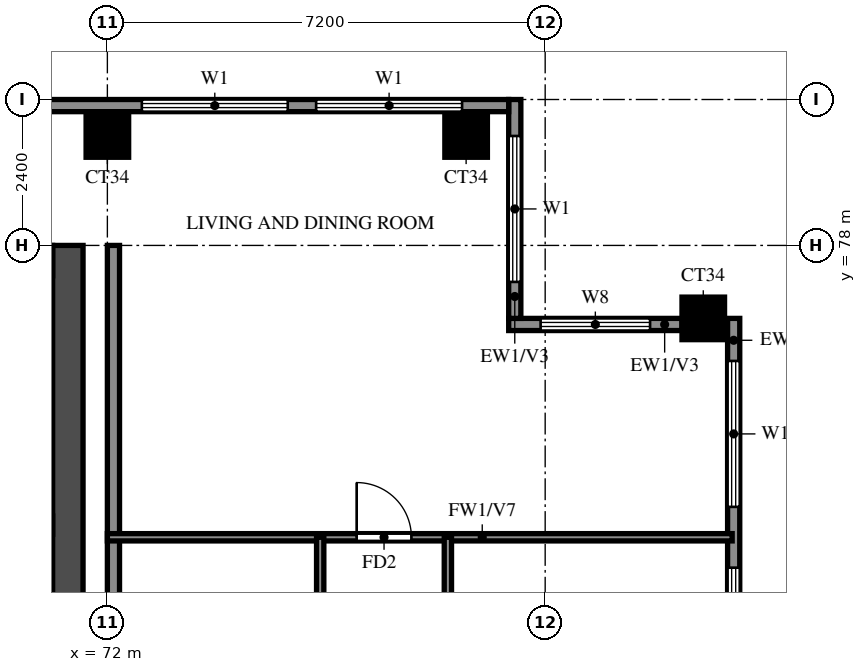
"""IFC4 building model, lengths in metres.
Left out: names, types, materials, properties, quantities, classifications, styles, units other than length and angle.
Written with IfcOpenShell. Run it as: python <this file> out.ifc"""

import sys

from ifc_helpers import new_model, si_unit, direction, frame, frame_2d, origin, origin_2d, place, context, subcontext, project, spatial, rectangle, extrude, source, transform, mapped, element, fill, save


model = new_model("IFC4")
c1 = context("Model", 3, precision=1e-05, world=origin(), true_north=direction((0.0, 1.0)))
c2 = subcontext(c1, "Body", "Model", "MODEL_VIEW")
j1 = project(units=[si_unit("LENGTHUNIT", "METRE"), si_unit("PLANEANGLEUNIT", "RADIAN")], contexts=[c1])
p1 = place(None, origin())
s1 = spatial("IfcSite", under=j1, at=p1, CompositionType="ELEMENT")
p2 = place(p1, origin())
s2 = spatial("IfcBuilding", under=s1, at=p2, CompositionType="ELEMENT")
p3 = place(p2, frame((0.0, 0.0, 229.0)))
s3 = spatial("IfcBuildingStorey", under=s2, at=p3, CompositionType="ELEMENT", Elevation=229.0)
m1 = source(origin(), c2, "Body", "SweptSolid", [
    extrude(rectangle(XDim=0.7, YDim=0.7, at=origin_2d()), origin(), (0.0, 0.0, 1.0), 3.22),
])
for number, where, z_axis, x_axis in (
    (1, (81.8, 76.8, 0.0), (0.0, 0.0, 1.0), (1.0, 0.0, 0.0)),
    (2, (72.0, 79.8, 0.0), (0.0, 0.0, 1.0), (1.0, 0.0, 0.0)),
    (3, (77.9, 79.8, 0.0), (0.0, 0.0, 1.0), (1.0, 0.0, 0.0)),
):
    element("IfcColumn", number, at=place(p3, frame(where, z_axis=z_axis, x_axis=x_axis)), inside=s3, PredefinedType="COLUMN", context=c2, shape_type="MappedRepresentation", body=[
        mapped(m1, transform((0.0, 0.0, 0.0))),
    ])
p4 = place(p3, frame((71.35, 66.15, 0.0), z_axis=(0.0, 0.0, 1.0), x_axis=(0.0, 1.0, 0.0)))
e4 = element("IfcWall", 4, at=p4, inside=s3, PredefinedType="SHEAR", context=c2, shape_type="SweptSolid", body=[
    extrude(rectangle(XDim=11.85, YDim=0.5, at=frame_2d((5.925, 0.0))), origin(), (0.0, 0.0, 1.0), 3.22),
])
p5 = place(p3, frame((29.7, 77.75, 0.0), z_axis=(0.0, 0.0, 1.0), x_axis=(1.0, 0.0, 0.0)))
e5 = element("IfcWall", 5, at=p5, inside=s3, PredefinedType="SHEAR", context=c2, shape_type="SweptSolid", body=[
    extrude(rectangle(XDim=41.4, YDim=0.5, at=frame_2d((20.7, 0.0))), origin(), (0.0, 0.0, 1.0), 3.22),
])
p6 = place(p3, frame((82.3, 69.6, 0.0), z_axis=(0.0, 0.0, 1.0), x_axis=(0.0, 1.0, 0.0)))
e6 = element("IfcWall", 6, at=p6, inside=s3, PredefinedType="SOLIDWALL", context=c2, shape_type="SweptSolid", body=[
    extrude(rectangle(XDim=7.2, YDim=0.2, at=frame_2d((3.6, 0.0))), origin(), (0.0, 0.0, 1.0), 3.22),
])
p7 = place(p6, frame((0.7, 0.0, 0.6)))
e7 = element("IfcOpeningElement", 7, at=p7, cuts=e6, PredefinedType="OPENING", context=c2, shape_type="SweptSolid", body=[
    extrude(rectangle(XDim=2.4, YDim=2.4, at=frame_2d((1.2, 1.2))), frame((0.0, 0.11, 0.0), z_axis=(0.0, -1.0, 0.0), x_axis=(1.0, 0.0, 0.0)), (0.0, 0.0, 1.0), 0.22),
])
p8 = place(p6, frame((4.1, 0.0, 0.6)))
e8 = element("IfcOpeningElement", 8, at=p8, cuts=e6, PredefinedType="OPENING", context=c2, shape_type="SweptSolid", body=[
    extrude(rectangle(XDim=2.4, YDim=2.4, at=frame_2d((1.2, 1.2))), frame((0.0, 0.11, 0.0), z_axis=(0.0, -1.0, 0.0), x_axis=(1.0, 0.0, 0.0)), (0.0, 0.0, 1.0), 0.22),
])
p9 = place(p3, frame((81.45, 76.7, 0.0), z_axis=(0.0, 0.0, 1.0), x_axis=(-1.0, 0.0, 0.0)))
e9 = element("IfcWall", 9, at=p9, inside=s3, PredefinedType="SOLIDWALL", context=c2, shape_type="SweptSolid", body=[
    extrude(rectangle(XDim=2.85, YDim=0.2, at=frame_2d((1.425, 0.0))), origin(), (0.0, 0.0, 1.0), 3.22),
])
p10 = place(p9, frame((0.525, 0.0, 0.6)))
e10 = element("IfcOpeningElement", 10, at=p10, cuts=e9, PredefinedType="OPENING", context=c2, shape_type="SweptSolid", body=[
    extrude(rectangle(XDim=1.8, YDim=2.4, at=frame_2d((0.9, 1.2))), frame((0.0, 0.11, 0.0), z_axis=(0.0, -1.0, 0.0), x_axis=(1.0, 0.0, 0.0)), (0.0, 0.0, 1.0), 0.22),
])
p11 = place(p3, frame((78.7, 76.8, 0.0), z_axis=(0.0, 0.0, 1.0), x_axis=(0.0, 1.0, 0.0)))
e11 = element("IfcWall", 11, at=p11, inside=s3, PredefinedType="SOLIDWALL", context=c2, shape_type="SweptSolid", body=[
    extrude(rectangle(XDim=3.6, YDim=0.2, at=frame_2d((1.8, 0.0))), origin(), (0.0, 0.0, 1.0), 3.22),
])
p12 = place(p11, frame((0.6, 0.0, 0.6)))
e12 = element("IfcOpeningElement", 12, at=p12, cuts=e11, PredefinedType="OPENING", context=c2, shape_type="SweptSolid", body=[
    extrude(rectangle(XDim=2.4, YDim=2.4, at=frame_2d((1.2, 1.2))), frame((0.0, 0.11, 0.0), z_axis=(0.0, -1.0, 0.0), x_axis=(1.0, 0.0, 0.0)), (0.0, 0.0, 1.0), 0.22),
])
p13 = place(p3, frame((78.6, 80.3, 0.0), z_axis=(0.0, 0.0, 1.0), x_axis=(-1.0, 0.0, 0.0)))
e13 = element("IfcWall", 13, at=p13, inside=s3, PredefinedType="SOLIDWALL", context=c2, shape_type="SweptSolid", body=[
    extrude(rectangle(XDim=56.6, YDim=0.2, at=frame_2d((28.3, 0.0))), origin(), (0.0, 0.0, 1.0), 3.22),
])
p14 = place(p13, frame((50.433, 0.0, 0.6)))
e14 = element("IfcOpeningElement", 14, at=p14, cuts=e13, PredefinedType="OPENING", context=c2, shape_type="SweptSolid", body=[
    extrude(rectangle(XDim=2.4, YDim=2.4, at=frame_2d((1.2, 1.2))), frame((0.0, 0.11, 0.0), z_axis=(0.0, -1.0, 0.0), x_axis=(1.0, 0.0, 0.0)), (0.0, 0.0, 1.0), 0.22),
])
p15 = place(p13, frame((53.367, 0.0, 0.6)))
e15 = element("IfcOpeningElement", 15, at=p15, cuts=e13, PredefinedType="OPENING", context=c2, shape_type="SweptSolid", body=[
    extrude(rectangle(XDim=2.4, YDim=2.4, at=frame_2d((1.2, 1.2))), frame((0.0, 0.11, 0.0), z_axis=(0.0, -1.0, 0.0), x_axis=(1.0, 0.0, 0.0)), (0.0, 0.0, 1.0), 0.22),
])
p16 = place(p13, frame((0.767, 0.0, 0.6)))
e16 = element("IfcOpeningElement", 16, at=p16, cuts=e13, PredefinedType="OPENING", context=c2, shape_type="SweptSolid", body=[
    extrude(rectangle(XDim=2.4, YDim=2.4, at=frame_2d((1.2, 1.2))), frame((0.0, 0.11, 0.0), z_axis=(0.0, -1.0, 0.0), x_axis=(1.0, 0.0, 0.0)), (0.0, 0.0, 1.0), 0.22),
])
p17 = place(p13, frame((3.633, 0.0, 0.6)))
e17 = element("IfcOpeningElement", 17, at=p17, cuts=e13, PredefinedType="OPENING", context=c2, shape_type="SweptSolid", body=[
    extrude(rectangle(XDim=2.4, YDim=2.4, at=frame_2d((1.2, 1.2))), frame((0.0, 0.11, 0.0), z_axis=(0.0, -1.0, 0.0), x_axis=(1.0, 0.0, 0.0)), (0.0, 0.0, 1.0), 0.22),
])
p18 = place(p3, frame((72.1, 62.4, 0.0), z_axis=(0.0, 0.0, 1.0), x_axis=(0.0, 1.0, 0.0)))
e18 = element("IfcWall", 18, at=p18, inside=s3, PredefinedType="SOLIDWALL", context=c2, shape_type="SweptSolid", body=[
    extrude(rectangle(XDim=15.6, YDim=0.2, at=frame_2d((7.8, 0.0))), origin(), (0.0, 0.0, 1.0), 3.22),
])
p19 = place(p3, frame((72.0, 73.2, 0.0), z_axis=(0.0, 0.0, 1.0), x_axis=(1.0, 0.0, 0.0)))
e19 = element("IfcWall", 19, at=p19, inside=s3, PredefinedType="PARTITIONING", context=c2, shape_type="SweptSolid", body=[
    extrude(rectangle(XDim=10.275, YDim=0.12, at=frame_2d((5.137, 0.0))), origin(), (0.0, 0.0, 1.0), 2.32),
])
p20 = place(p19, frame((4.1, 0.0, 0.0)))
e20 = element("IfcOpeningElement", 20, at=p20, cuts=e19, PredefinedType="OPENING", context=c2, shape_type="SweptSolid", body=[
    extrude(rectangle(XDim=0.9, YDim=2.1, at=frame_2d((0.45, 1.05))), frame((0.0, 0.07, 0.0), z_axis=(0.0, -1.0, 0.0), x_axis=(1.0, 0.0, 0.0)), (0.0, 0.0, 1.0), 0.14),
])
p21 = place(p3, frame((75.5, 64.8, 0.0), z_axis=(0.0, 0.0, 1.0), x_axis=(0.0, 1.0, 0.0)))
e21 = element("IfcWall", 21, at=p21, inside=s3, PredefinedType="PARTITIONING", context=c2, shape_type="SweptSolid", body=[
    extrude(rectangle(XDim=8.4, YDim=0.12, at=frame_2d((4.2, 0.0))), origin(), (0.0, 0.0, 1.0), 3.22),
])
p22 = place(p21, frame((1.925, 0.0, 0.0)))
e22 = element("IfcOpeningElement", 22, at=p22, cuts=e21, PredefinedType="OPENING", context=c2, shape_type="SweptSolid", body=[
    extrude(rectangle(XDim=0.9, YDim=2.1, at=frame_2d((0.45, 1.05))), frame((0.0, 0.07, 0.0), z_axis=(0.0, -1.0, 0.0), x_axis=(1.0, 0.0, 0.0)), (0.0, 0.0, 1.0), 0.14),
])
p23 = place(p21, frame((6.175, 0.0, 0.0)))
e23 = element("IfcOpeningElement", 23, at=p23, cuts=e21, PredefinedType="OPENING", context=c2, shape_type="SweptSolid", body=[
    extrude(rectangle(XDim=0.8, YDim=2.1, at=frame_2d((0.4, 1.05))), frame((0.0, 0.07, 0.0), z_axis=(0.0, -1.0, 0.0), x_axis=(1.0, 0.0, 0.0)), (0.0, 0.0, 1.0), 0.14),
])
p24 = place(p3, frame((77.6, 55.2, 0.0), z_axis=(0.0, 0.0, 1.0), x_axis=(0.0, 1.0, 0.0)))
e24 = element("IfcWall", 24, at=p24, inside=s3, PredefinedType="PARTITIONING", context=c2, shape_type="SweptSolid", body=[
    extrude(rectangle(XDim=18.0, YDim=0.12, at=frame_2d((9.0, 0.0))), origin(), (0.0, 0.0, 1.0), 3.22),
])
p25 = place(p24, frame((2.85, 0.0, 0.0)))
e25 = element("IfcOpeningElement", 25, at=p25, cuts=e24, PredefinedType="OPENING", context=c2, shape_type="SweptSolid", body=[
    extrude(rectangle(XDim=1.5, YDim=2.1, at=frame_2d((0.75, 1.05))), frame((0.0, 0.07, 0.0), z_axis=(0.0, -1.0, 0.0), x_axis=(1.0, 0.0, 0.0)), (0.0, 0.0, 1.0), 0.14),
])
p26 = place(p24, frame((8.55, 0.0, 0.0)))
e26 = element("IfcOpeningElement", 26, at=p26, cuts=e24, PredefinedType="OPENING", context=c2, shape_type="SweptSolid", body=[
    extrude(rectangle(XDim=0.9, YDim=2.1, at=frame_2d((0.45, 1.05))), frame((0.0, 0.07, 0.0), z_axis=(0.0, -1.0, 0.0), x_axis=(1.0, 0.0, 0.0)), (0.0, 0.0, 1.0), 0.14),
])
p27 = place(p24, frame((12.15, 0.0, 0.0)))
e27 = element("IfcOpeningElement", 27, at=p27, cuts=e24, PredefinedType="OPENING", context=c2, shape_type="SweptSolid", body=[
    extrude(rectangle(XDim=0.9, YDim=2.1, at=frame_2d((0.45, 1.05))), frame((0.0, 0.07, 0.0), z_axis=(0.0, -1.0, 0.0), x_axis=(1.0, 0.0, 0.0)), (0.0, 0.0, 1.0), 0.14),
])
p28 = place(p24, frame((15.75, 0.0, 0.0)))
e28 = element("IfcOpeningElement", 28, at=p28, cuts=e24, PredefinedType="OPENING", context=c2, shape_type="SweptSolid", body=[
    extrude(rectangle(XDim=0.9, YDim=2.1, at=frame_2d((0.45, 1.05))), frame((0.0, 0.07, 0.0), z_axis=(0.0, -1.0, 0.0), x_axis=(1.0, 0.0, 0.0)), (0.0, 0.0, 1.0), 0.14),
])
p29 = place(p7, origin())
e29 = element("IfcWindow", 29, at=p29, inside=s3, PartitioningType="DOUBLE_PANEL_VERTICAL", PredefinedType="WINDOW", context=c2, shape_type="SweptSolid", body=[
    extrude(rectangle(XDim=2.4, YDim=2.4, at=frame_2d((1.2, 1.2))), frame((0.0, 0.03, 0.0), z_axis=(0.0, -1.0, 0.0), x_axis=(1.0, 0.0, 0.0)), (0.0, 0.0, 1.0), 0.06),
])
fill(e7, e29)
p30 = place(p8, origin())
e30 = element("IfcWindow", 30, at=p30, inside=s3, PartitioningType="DOUBLE_PANEL_VERTICAL", PredefinedType="WINDOW", context=c2, shape_type="SweptSolid", body=[
    extrude(rectangle(XDim=2.4, YDim=2.4, at=frame_2d((1.2, 1.2))), frame((0.0, 0.03, 0.0), z_axis=(0.0, -1.0, 0.0), x_axis=(1.0, 0.0, 0.0)), (0.0, 0.0, 1.0), 0.06),
])
fill(e8, e30)
p31 = place(p10, origin())
e31 = element("IfcWindow", 31, at=p31, inside=s3, PartitioningType="DOUBLE_PANEL_VERTICAL", PredefinedType="WINDOW", context=c2, shape_type="SweptSolid", body=[
    extrude(rectangle(XDim=1.8, YDim=2.4, at=frame_2d((0.9, 1.2))), frame((0.0, 0.03, 0.0), z_axis=(0.0, -1.0, 0.0), x_axis=(1.0, 0.0, 0.0)), (0.0, 0.0, 1.0), 0.06),
])
fill(e10, e31)
p32 = place(p12, origin())
e32 = element("IfcWindow", 32, at=p32, inside=s3, PartitioningType="DOUBLE_PANEL_VERTICAL", PredefinedType="WINDOW", context=c2, shape_type="SweptSolid", body=[
    extrude(rectangle(XDim=2.4, YDim=2.4, at=frame_2d((1.2, 1.2))), frame((0.0, 0.03, 0.0), z_axis=(0.0, -1.0, 0.0), x_axis=(1.0, 0.0, 0.0)), (0.0, 0.0, 1.0), 0.06),
])
fill(e12, e32)
p33 = place(p16, origin())
e33 = element("IfcWindow", 33, at=p33, inside=s3, PartitioningType="DOUBLE_PANEL_VERTICAL", PredefinedType="WINDOW", context=c2, shape_type="SweptSolid", body=[
    extrude(rectangle(XDim=2.4, YDim=2.4, at=frame_2d((1.2, 1.2))), frame((0.0, 0.03, 0.0), z_axis=(0.0, -1.0, 0.0), x_axis=(1.0, 0.0, 0.0)), (0.0, 0.0, 1.0), 0.06),
])
fill(e16, e33)
p34 = place(p17, origin())
e34 = element("IfcWindow", 34, at=p34, inside=s3, PartitioningType="DOUBLE_PANEL_VERTICAL", PredefinedType="WINDOW", context=c2, shape_type="SweptSolid", body=[
    extrude(rectangle(XDim=2.4, YDim=2.4, at=frame_2d((1.2, 1.2))), frame((0.0, 0.03, 0.0), z_axis=(0.0, -1.0, 0.0), x_axis=(1.0, 0.0, 0.0)), (0.0, 0.0, 1.0), 0.06),
])
fill(e17, e34)
p35 = place(p20, origin())
e35 = element("IfcDoor", 35, at=p35, inside=s3, OperationType="SINGLE_SWING_LEFT", PredefinedType="DOOR", context=c2, shape_type="SweptSolid", body=[
    extrude(rectangle(XDim=0.9, YDim=2.1, at=frame_2d((0.45, 1.05))), frame((0.0, 0.025, 0.0), z_axis=(0.0, -1.0, 0.0), x_axis=(1.0, 0.0, 0.0)), (0.0, 0.0, 1.0), 0.05),
])
fill(e20, e35)
save(model, sys.argv[1])
